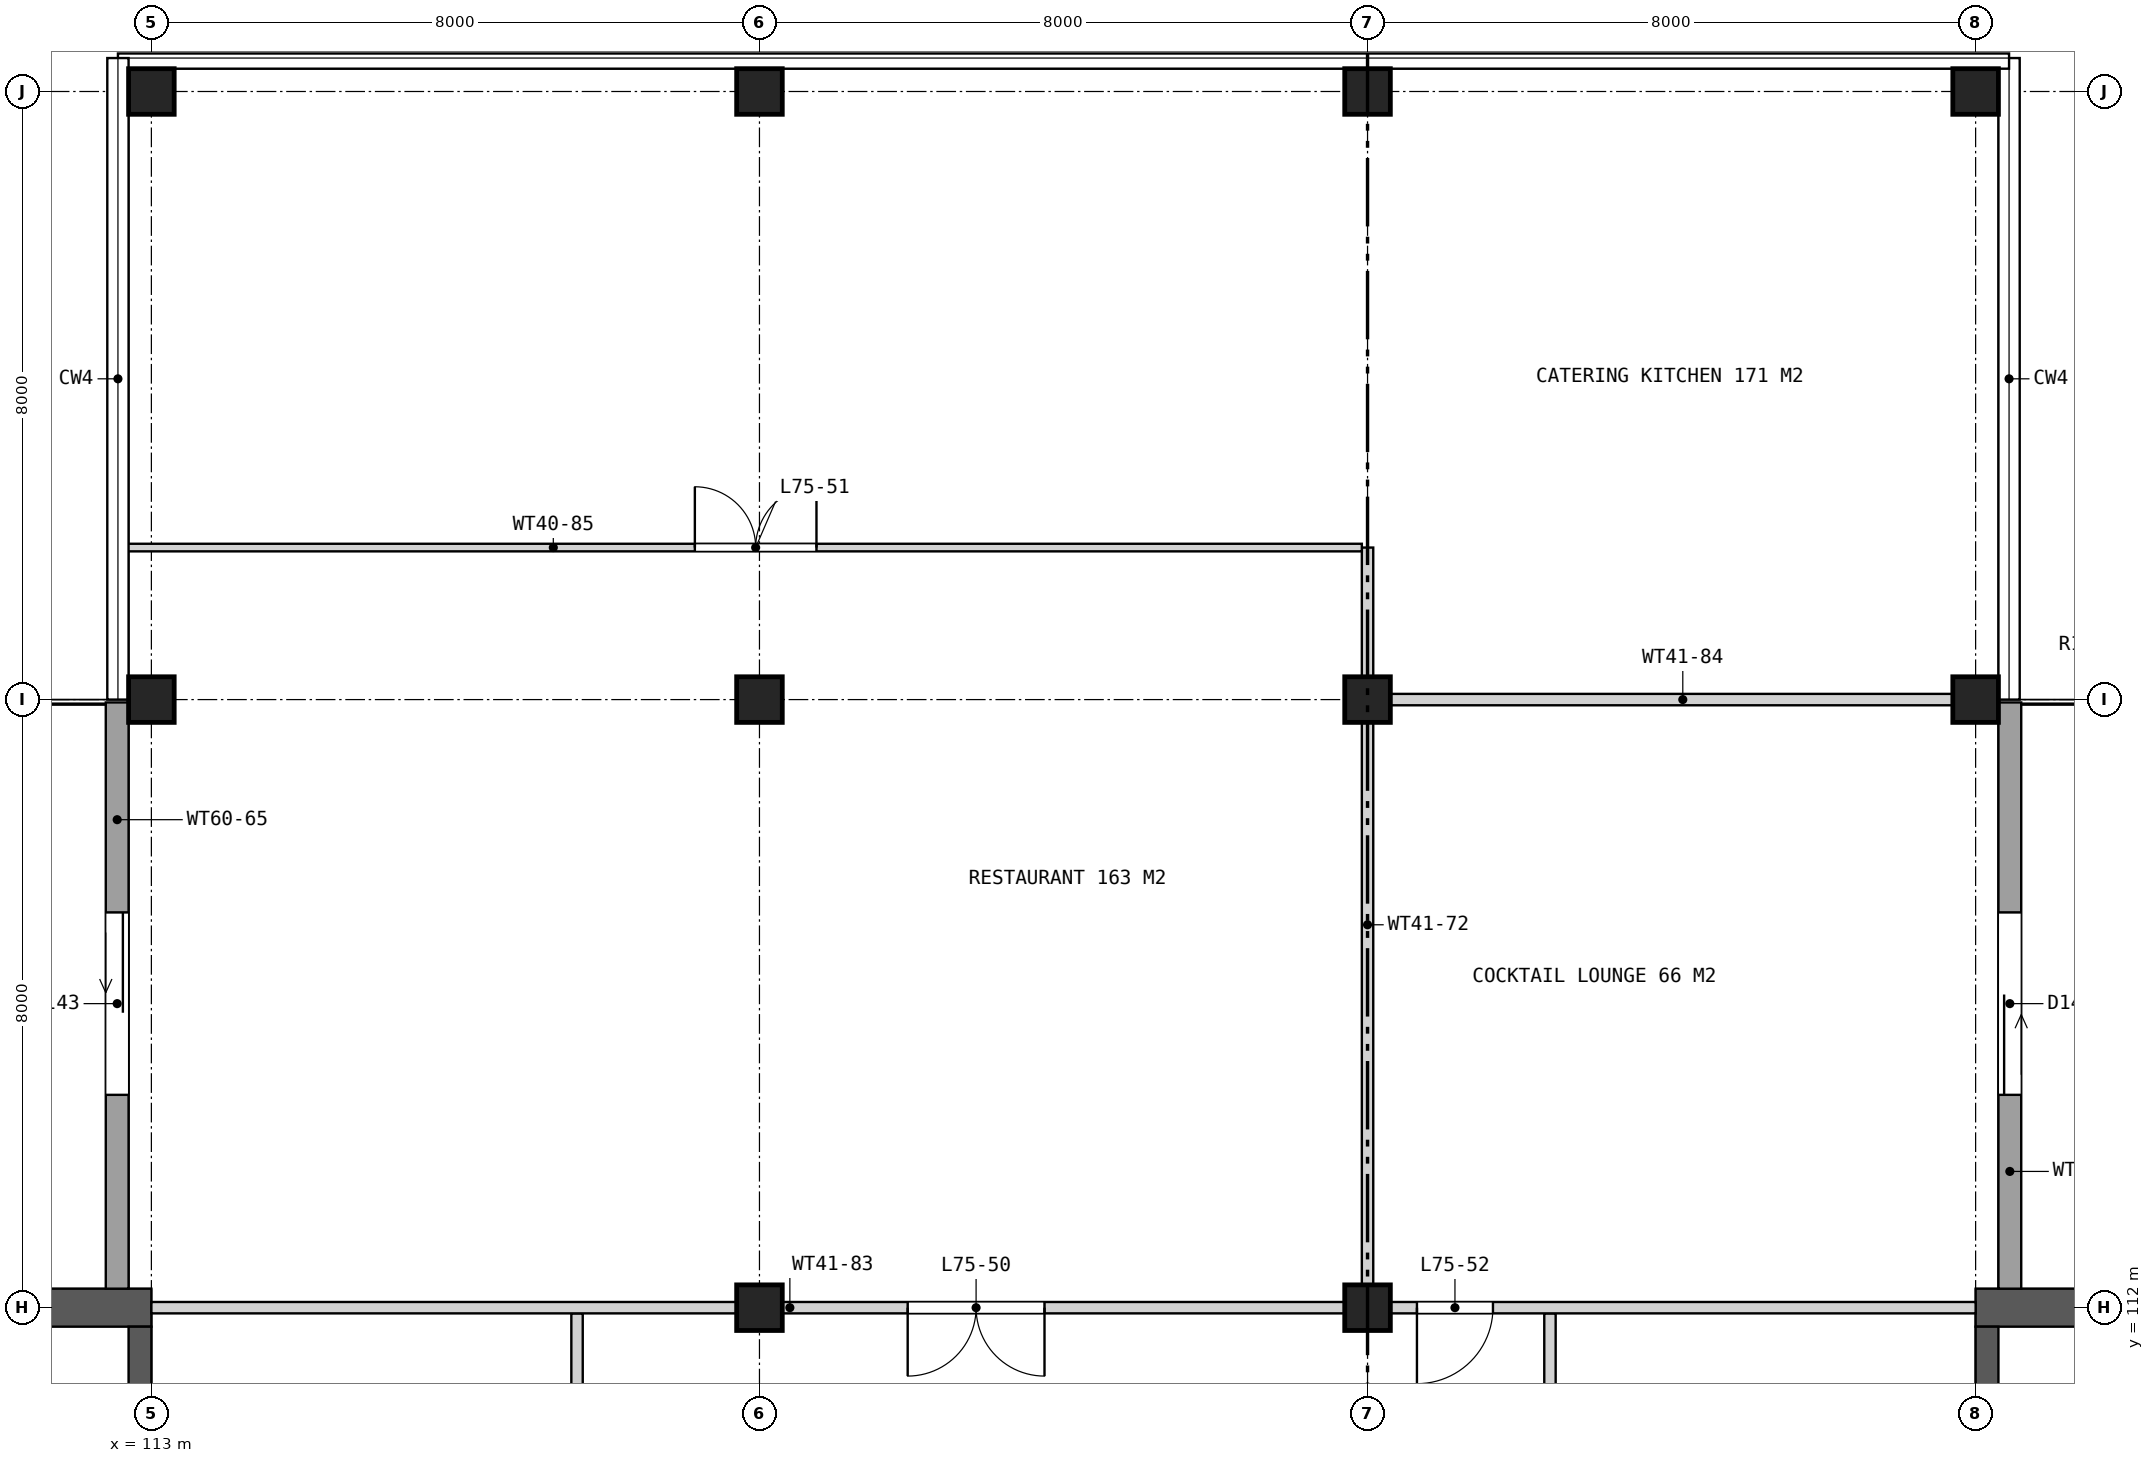
"""IFC4 building model, lengths in metres.
Left out: names, types, materials, properties, quantities, classifications, styles, units other than length and angle.
Written with IfcOpenShell. Run it as: python <this file> out.ifc"""

import sys

from ifc_helpers import new_model, si_unit, direction, frame, frame_2d, origin, origin_2d, place, context, subcontext, project, spatial, rectangle, extrude, element, fill, save


model = new_model("IFC4")
c1 = context("Model", 3, precision=1e-05, world=origin(), true_north=direction((0.0, 1.0)))
c2 = subcontext(c1, "Body", "Model", "MODEL_VIEW")
j1 = project(units=[si_unit("LENGTHUNIT", "METRE"), si_unit("PLANEANGLEUNIT", "RADIAN")], contexts=[c1])
p1 = place(None, origin())
s1 = spatial("IfcSite", under=j1, at=p1, CompositionType="ELEMENT")
p2 = place(p1, origin())
s2 = spatial("IfcBuilding", under=s1, at=p2, CompositionType="ELEMENT")
p3 = place(p2, frame((0.0, 0.0, 344.9)))
s3 = spatial("IfcBuildingStorey", under=s2, at=p3, CompositionType="ELEMENT", Elevation=344.9)
for number, where, z_axis, x_axis in (
    (1, (113.0, 120.0, 0.0), (0.0, 0.0, 1.0), (1.0, 0.0, 0.0)),
    (2, (113.0, 128.0, 0.0), (0.0, 0.0, 1.0), (1.0, 0.0, 0.0)),
    (3, (121.0, 112.0, 0.0), (0.0, 0.0, 1.0), (1.0, 0.0, 0.0)),
    (4, (121.0, 120.0, 0.0), (0.0, 0.0, 1.0), (1.0, 0.0, 0.0)),
    (5, (121.0, 128.0, 0.0), (0.0, 0.0, 1.0), (1.0, 0.0, 0.0)),
    (6, (129.0, 112.0, 0.0), (0.0, 0.0, 1.0), (1.0, 0.0, 0.0)),
    (7, (129.0, 120.0, 0.0), (0.0, 0.0, 1.0), (1.0, 0.0, 0.0)),
    (8, (129.0, 128.0, 0.0), (0.0, 0.0, 1.0), (1.0, 0.0, 0.0)),
    (9, (137.0, 120.0, 0.0), (0.0, 0.0, 1.0), (1.0, 0.0, 0.0)),
    (10, (137.0, 128.0, 0.0), (0.0, 0.0, 1.0), (1.0, 0.0, 0.0)),
):
    element("IfcColumn", number, at=place(p3, frame(where, z_axis=z_axis, x_axis=x_axis)), inside=s3, PredefinedType="COLUMN", context=c2, shape_type="SweptSolid", body=[
        extrude(rectangle(XDim=0.6, YDim=0.6, at=origin_2d()), origin(), (0.0, 0.0, 1.0), 4.2),
    ])
p4 = place(p3, frame((137.0, 112.0, 0.0), z_axis=(0.0, 0.0, 1.0), x_axis=(1.0, 0.0, 0.0)))
e11 = element("IfcWall", 11, at=p4, inside=s3, PredefinedType="SHEAR", context=c2, shape_type="SweptSolid", body=[
    extrude(rectangle(XDim=7.1, YDim=0.5, at=frame_2d((3.55, 0.0))), origin(), (0.0, 0.0, 1.0), 4.2),
])
p5 = place(p3, frame((137.15, 105.7, 0.0), z_axis=(0.0, 0.0, 1.0), x_axis=(0.0, 1.0, 0.0)))
e12 = element("IfcWall", 12, at=p5, inside=s3, PredefinedType="SHEAR", context=c2, shape_type="SweptSolid", body=[
    extrude(rectangle(XDim=6.05, YDim=0.3, at=frame_2d((3.025, 0.0))), origin(), (0.0, 0.0, 1.0), 4.2),
])
p6 = place(p3, frame((113.0, 112.0, 0.0), z_axis=(0.0, 0.0, 1.0), x_axis=(-1.0, 0.0, 0.0)))
e13 = element("IfcWall", 13, at=p6, inside=s3, PredefinedType="SHEAR", context=c2, shape_type="SweptSolid", body=[
    extrude(rectangle(XDim=7.1, YDim=0.5, at=frame_2d((3.55, 0.0))), origin(), (0.0, 0.0, 1.0), 4.2),
])
p7 = place(p3, frame((112.85, 111.75, 0.0), z_axis=(0.0, 0.0, 1.0), x_axis=(0.0, -1.0, 0.0)))
e14 = element("IfcWall", 14, at=p7, inside=s3, PredefinedType="SHEAR", context=c2, shape_type="SweptSolid", body=[
    extrude(rectangle(XDim=6.05, YDim=0.3, at=frame_2d((3.025, 0.0))), origin(), (0.0, 0.0, 1.0), 4.2),
])
p8 = place(p3, frame((137.45, 112.25, 0.0), z_axis=(0.0, 0.0, 1.0), x_axis=(0.0, 1.0, 0.0)))
e15 = element("IfcWall", 15, at=p8, inside=s3, PredefinedType="SOLIDWALL", context=c2, shape_type="SweptSolid", body=[
    extrude(rectangle(XDim=7.712, YDim=0.3, at=frame_2d((3.856, 0.0))), origin(), (0.0, 0.0, 1.0), 3.85),
])
p9 = place(p8, frame((2.55, 0.0, 0.0)))
e16 = element("IfcOpeningElement", 16, at=p9, cuts=e15, PredefinedType="OPENING", context=c2, shape_type="SweptSolid", body=[
    extrude(rectangle(XDim=2.4, YDim=2.4, at=frame_2d((1.2, 1.2))), frame((0.0, 0.16, 0.0), z_axis=(0.0, -1.0, 0.0), x_axis=(1.0, 0.0, 0.0)), (0.0, 0.0, 1.0), 0.32),
])
p10 = place(p3, frame((112.55, 119.962, 0.0), z_axis=(0.0, 0.0, 1.0), x_axis=(0.0, -1.0, 0.0)))
e17 = element("IfcWall", 17, at=p10, inside=s3, PredefinedType="SOLIDWALL", context=c2, shape_type="SweptSolid", body=[
    extrude(rectangle(XDim=7.712, YDim=0.3, at=frame_2d((3.856, 0.0))), origin(), (0.0, 0.0, 1.0), 3.85),
])
p11 = place(p10, frame((2.762, 0.0, 0.0)))
e18 = element("IfcOpeningElement", 18, at=p11, cuts=e17, PredefinedType="OPENING", context=c2, shape_type="SweptSolid", body=[
    extrude(rectangle(XDim=2.4, YDim=2.4, at=frame_2d((1.2, 1.2))), frame((0.0, 0.16, 0.0), z_axis=(0.0, -1.0, 0.0), x_axis=(1.0, 0.0, 0.0)), (0.0, 0.0, 1.0), 0.32),
])
p12 = place(p3, frame((118.6, 106.0, 0.0), z_axis=(0.0, 0.0, 1.0), x_axis=(0.0, 1.0, 0.0)))
e19 = element("IfcWall", 19, at=p12, inside=s3, PredefinedType="PARTITIONING", context=c2, shape_type="SweptSolid", body=[
    extrude(rectangle(XDim=5.925, YDim=0.15, at=frame_2d((2.962, 0.0))), origin(), (0.0, 0.0, 1.0), 3.396),
])
p13 = place(p12, frame((2.45, 0.0, 0.0)))
e20 = element("IfcOpeningElement", 20, at=p13, cuts=e19, PredefinedType="OPENING", context=c2, shape_type="SweptSolid", body=[
    extrude(rectangle(XDim=1.0, YDim=2.1, at=frame_2d((0.5, 1.05))), frame((0.0, 0.085, 0.0), z_axis=(0.0, -1.0, 0.0), x_axis=(1.0, 0.0, 0.0)), (0.0, 0.0, 1.0), 0.17),
])
p14 = place(p3, frame((129.0, 112.075, 0.0), z_axis=(0.0, 0.0, 1.0), x_axis=(0.0, 1.0, 0.0)))
e21 = element("IfcWall", 21, at=p14, inside=s3, PredefinedType="PARTITIONING", context=c2, shape_type="SweptSolid", body=[
    extrude(rectangle(XDim=9.925, YDim=0.15, at=frame_2d((4.962, 0.0))), origin(), (0.0, 0.0, 1.0), 3.396),
])
p15 = place(p3, frame((131.4, 106.0, 0.0), z_axis=(0.0, 0.0, 1.0), x_axis=(0.0, 1.0, 0.0)))
e22 = element("IfcWall", 22, at=p15, inside=s3, PredefinedType="PARTITIONING", context=c2, shape_type="SweptSolid", body=[
    extrude(rectangle(XDim=5.925, YDim=0.15, at=frame_2d((2.962, 0.0))), origin(), (0.0, 0.0, 1.0), 3.396),
])
p16 = place(p15, frame((2.45, 0.0, 0.0)))
e23 = element("IfcOpeningElement", 23, at=p16, cuts=e22, PredefinedType="OPENING", context=c2, shape_type="SweptSolid", body=[
    extrude(rectangle(XDim=1.0, YDim=2.1, at=frame_2d((0.5, 1.05))), frame((0.0, 0.085, 0.0), z_axis=(0.0, -1.0, 0.0), x_axis=(1.0, 0.0, 0.0)), (0.0, 0.0, 1.0), 0.17),
])
p17 = place(p3, frame((113.0, 112.0, 0.0), z_axis=(0.0, 0.0, 1.0), x_axis=(1.0, 0.0, 0.0)))
e24 = element("IfcWall", 24, at=p17, inside=s3, PredefinedType="PARTITIONING", context=c2, shape_type="SweptSolid", body=[
    extrude(rectangle(XDim=24.0, YDim=0.15, at=frame_2d((12.0, 0.0))), origin(), (0.0, 0.0, 1.0), 3.396),
])
p18 = place(p17, frame((9.95, 0.0, 0.0)))
e25 = element("IfcOpeningElement", 25, at=p18, cuts=e24, PredefinedType="OPENING", context=c2, shape_type="SweptSolid", body=[
    extrude(rectangle(XDim=1.8, YDim=2.1, at=frame_2d((0.9, 1.05))), frame((0.0, 0.085, 0.0), z_axis=(0.0, -1.0, 0.0), x_axis=(1.0, 0.0, 0.0)), (0.0, 0.0, 1.0), 0.17),
])
p19 = place(p17, frame((16.65, 0.0, 0.0)))
e26 = element("IfcOpeningElement", 26, at=p19, cuts=e24, PredefinedType="OPENING", context=c2, shape_type="SweptSolid", body=[
    extrude(rectangle(XDim=1.0, YDim=2.1, at=frame_2d((0.5, 1.05))), frame((0.0, 0.085, 0.0), z_axis=(0.0, -1.0, 0.0), x_axis=(1.0, 0.0, 0.0)), (0.0, 0.0, 1.0), 0.17),
])
p20 = place(p3, frame((129.075, 120.0, 0.0), z_axis=(0.0, 0.0, 1.0), x_axis=(1.0, 0.0, 0.0)))
e27 = element("IfcWall", 27, at=p20, inside=s3, PredefinedType="PARTITIONING", context=c2, shape_type="SweptSolid", body=[
    extrude(rectangle(XDim=8.145, YDim=0.15, at=frame_2d((4.073, 0.0))), origin(), (0.0, 0.0, 1.0), 3.396),
])
p21 = place(p3, frame((112.56, 122.0, 0.0), z_axis=(0.0, 0.0, 1.0), x_axis=(1.0, 0.0, 0.0)))
e28 = element("IfcWall", 28, at=p21, inside=s3, PredefinedType="PARTITIONING", context=c2, shape_type="SweptSolid", body=[
    extrude(rectangle(XDim=16.365, YDim=0.1, at=frame_2d((8.183, 0.0))), origin(), (0.0, 0.0, 1.0), 3.396),
])
p22 = place(p21, frame((7.59, 0.0, 0.0)))
e29 = element("IfcOpeningElement", 29, at=p22, cuts=e28, PredefinedType="OPENING", context=c2, shape_type="SweptSolid", body=[
    extrude(rectangle(XDim=1.6, YDim=2.1, at=frame_2d((0.8, 1.05))), frame((0.0, 0.06, 0.0), z_axis=(0.0, -1.0, 0.0), x_axis=(1.0, 0.0, 0.0)), (0.0, 0.0, 1.0), 0.12),
])
p23 = place(p9, frame((2.4, 0.0, 0.0), z_axis=(0.0, 0.0, 1.0), x_axis=(-1.0, 0.0, 0.0)))
e30 = element("IfcDoor", 30, at=p23, inside=s3, OperationType="SLIDING_TO_LEFT", PredefinedType="DOOR", context=c2, shape_type="SweptSolid", body=[
    extrude(rectangle(XDim=2.4, YDim=2.4, at=frame_2d((1.2, 1.2))), frame((0.0, 0.025, 0.0), z_axis=(0.0, -1.0, 0.0), x_axis=(1.0, 0.0, 0.0)), (0.0, 0.0, 1.0), 0.05),
])
fill(e16, e30)
p24 = place(p11, frame((2.4, 0.0, 0.0), z_axis=(0.0, 0.0, 1.0), x_axis=(-1.0, 0.0, 0.0)))
e31 = element("IfcDoor", 31, at=p24, inside=s3, OperationType="SLIDING_TO_LEFT", PredefinedType="DOOR", context=c2, shape_type="SweptSolid", body=[
    extrude(rectangle(XDim=2.4, YDim=2.4, at=frame_2d((1.2, 1.2))), frame((0.0, 0.025, 0.0), z_axis=(0.0, -1.0, 0.0), x_axis=(1.0, 0.0, 0.0)), (0.0, 0.0, 1.0), 0.05),
])
fill(e18, e31)
p25 = place(p18, frame((1.8, 0.0, 0.0), z_axis=(0.0, 0.0, 1.0), x_axis=(-1.0, 0.0, 0.0)))
e32 = element("IfcDoor", 32, at=p25, inside=s3, OperationType="DOUBLE_DOOR_SINGLE_SWING", PredefinedType="DOOR", context=c2, shape_type="SweptSolid", body=[
    extrude(rectangle(XDim=1.8, YDim=2.1, at=frame_2d((0.9, 1.05))), frame((0.0, 0.025, 0.0), z_axis=(0.0, -1.0, 0.0), x_axis=(1.0, 0.0, 0.0)), (0.0, 0.0, 1.0), 0.05),
])
fill(e25, e32)
p26 = place(p22, origin())
e33 = element("IfcDoor", 33, at=p26, inside=s3, OperationType="DOUBLE_DOOR_SINGLE_SWING", PredefinedType="DOOR", context=c2, shape_type="SweptSolid", body=[
    extrude(rectangle(XDim=1.6, YDim=2.1, at=frame_2d((0.8, 1.05))), frame((0.0, 0.025, 0.0), z_axis=(0.0, -1.0, 0.0), x_axis=(1.0, 0.0, 0.0)), (0.0, 0.0, 1.0), 0.05),
])
fill(e29, e33)
p27 = place(p19, frame((1.0, 0.0, 0.0), z_axis=(0.0, 0.0, 1.0), x_axis=(-1.0, 0.0, 0.0)))
e34 = element("IfcDoor", 34, at=p27, inside=s3, OperationType="SINGLE_SWING_RIGHT", PredefinedType="DOOR", context=c2, shape_type="SweptSolid", body=[
    extrude(rectangle(XDim=1.0, YDim=2.1, at=frame_2d((0.5, 1.05))), frame((0.0, 0.025, 0.0), z_axis=(0.0, -1.0, 0.0), x_axis=(1.0, 0.0, 0.0)), (0.0, 0.0, 1.0), 0.05),
])
fill(e26, e34)
save(model, sys.argv[1])
